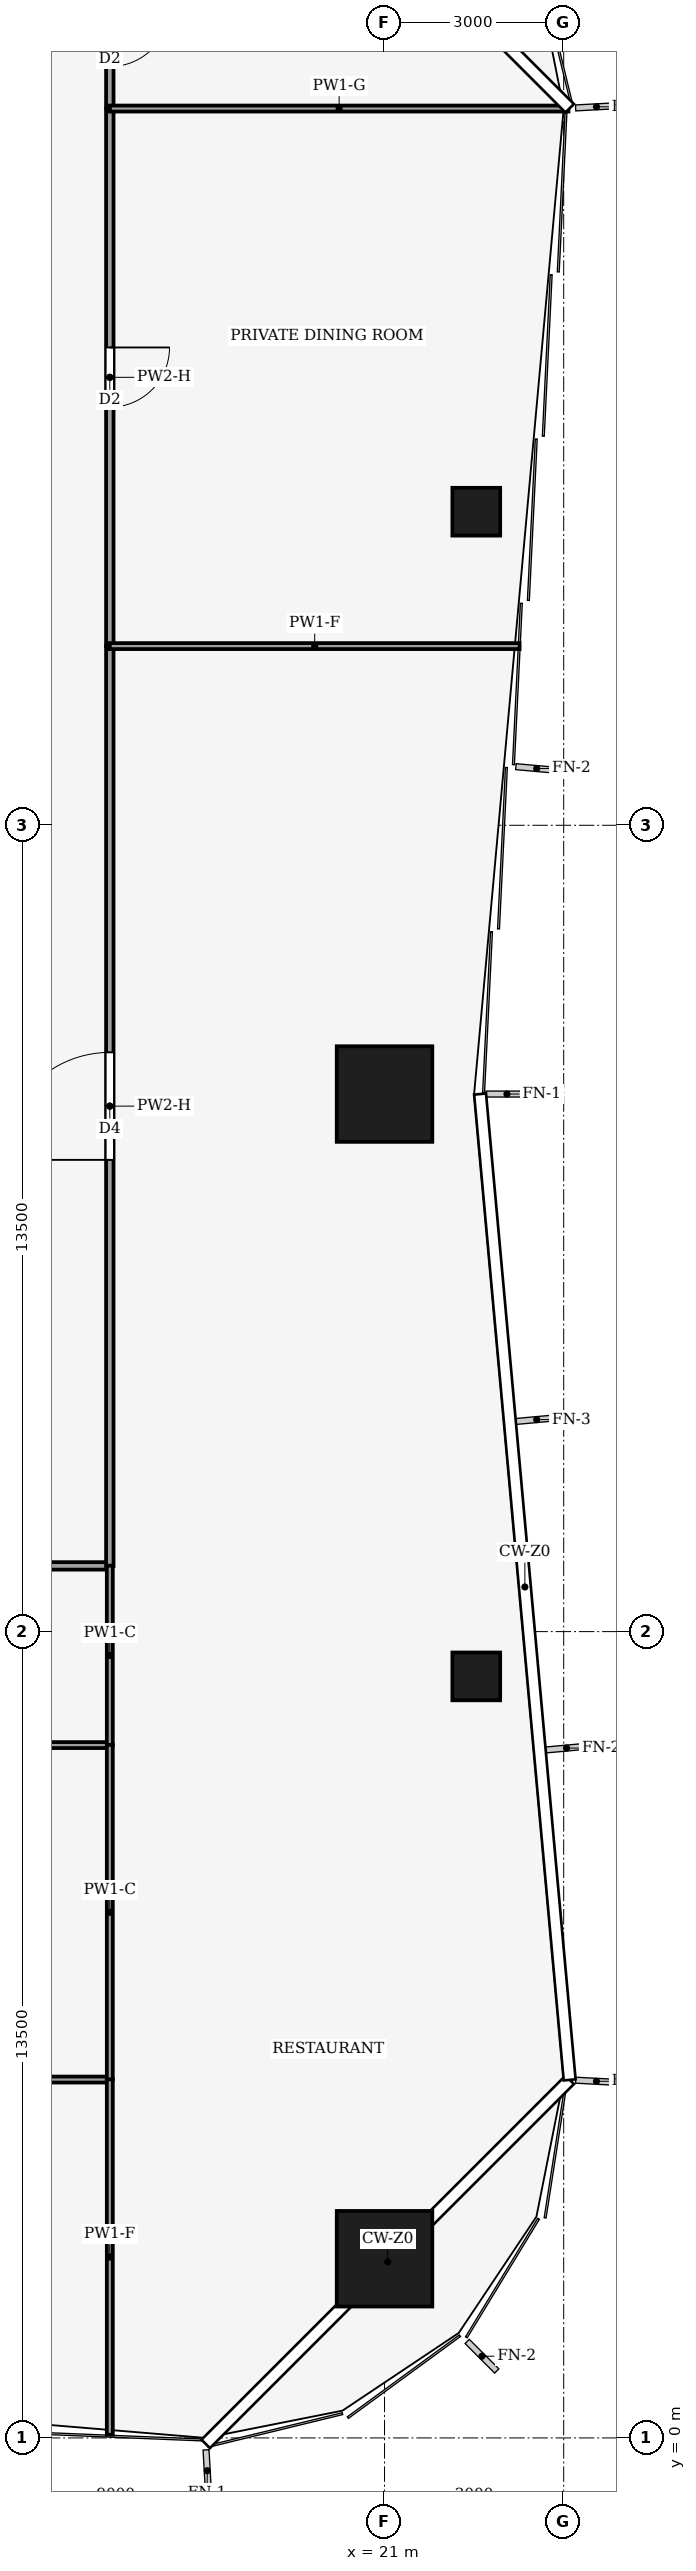
"""IFC4 building model, lengths in metres.
Left out: names, types, materials, properties, quantities, classifications, styles, units other than length and angle.
Written with IfcOpenShell. Run it as: python <this file> out.ifc"""

import sys

from ifc_helpers import new_model, si_unit, direction, frame, frame_2d, origin, origin_2d, place, context, subcontext, project, spatial, rectangle, hollow_rectangle, extrude, element, fill, save


model = new_model("IFC4")
c1 = context("Model", 3, precision=1e-05, world=origin(), true_north=direction((0.0, 1.0)))
c2 = subcontext(c1, "Body", "Model", "MODEL_VIEW")
j1 = project(units=[si_unit("LENGTHUNIT", "METRE"), si_unit("PLANEANGLEUNIT", "RADIAN")], contexts=[c1])
p1 = place(None, origin())
s1 = spatial("IfcSite", under=j1, at=p1, CompositionType="ELEMENT")
p2 = place(p1, origin())
s2 = spatial("IfcBuilding", under=s1, at=p2, CompositionType="ELEMENT")
p3 = place(p2, frame((0.0, 0.0, 14.0)))
s3 = spatial("IfcBuildingStorey", under=s2, at=p3, CompositionType="ELEMENT", Elevation=14.0)
for number, where, z_axis, x_axis in (
    (1, (21.0, 22.5, 0.0), (0.0, 0.0, 1.0), (1.0, 0.0, 0.0)),
    (2, (21.0, 3.0, 0.0), (0.0, 0.0, 1.0), (1.0, 0.0, 0.0)),
):
    element("IfcColumn", number, at=place(p3, frame(where, z_axis=z_axis, x_axis=x_axis)), inside=s3, PredefinedType="COLUMN", context=c2, shape_type="SweptSolid", body=[
        extrude(hollow_rectangle(XDim=1.6, YDim=1.6, WallThickness=0.09, at=origin_2d()), origin(), (0.0, 0.0, 1.0), 4.0),
    ])
for number, where, z_axis, x_axis in (
    (3, (22.536, 12.75, 0.0), (0.0, 0.0, 1.0), (1.0, 0.0, 0.0)),
    (4, (22.536, 32.25, 0.0), (0.0, 0.0, 1.0), (1.0, 0.0, 0.0)),
):
    element("IfcColumn", number, at=place(p3, frame(where, z_axis=z_axis, x_axis=x_axis)), inside=s3, PredefinedType="COLUMN", context=c2, shape_type="SweptSolid", body=[
        extrude(hollow_rectangle(XDim=0.8, YDim=0.8, WallThickness=0.04, at=origin_2d()), origin(), (0.0, 0.0, 1.0), 4.0),
    ])
p4 = place(p3, frame((16.4, 14.6, 0.0), z_axis=(0.0, 0.0, 1.0), x_axis=(-1.0, 0.0, 0.0)))
e5 = element("IfcWall", 5, at=p4, inside=s3, PredefinedType="PARTITIONING", context=c2, shape_type="SweptSolid", body=[
    extrude(rectangle(XDim=4.4, YDim=0.125, at=frame_2d((2.2, 0.0))), origin(), (0.0, 0.0, 1.0), 3.29),
])
p5 = place(p4, frame((1.7, 0.0, 0.0)))
e6 = element("IfcOpeningElement", 6, at=p5, cuts=e5, PredefinedType="OPENING", context=c2, shape_type="SweptSolid", body=[
    extrude(rectangle(XDim=1.0, YDim=2.1, at=frame_2d((0.5, 1.05))), frame((0.0, 0.073, 0.0), z_axis=(0.0, -1.0, 0.0), x_axis=(1.0, 0.0, 0.0)), (0.0, 0.0, 1.0), 0.145),
])
p6 = place(p3, frame((16.4, 14.596, 0.0), z_axis=(0.0, 0.0, 1.0), x_axis=(0.0, 1.0, 0.0)))
e7 = element("IfcWall", 7, at=p6, inside=s3, PredefinedType="PARTITIONING", context=c2, shape_type="SweptSolid", body=[
    extrude(rectangle(XDim=15.404, YDim=0.125, at=frame_2d((7.702, 0.0))), origin(), (0.0, 0.0, 1.0), 3.14),
])
p7 = place(p6, frame((6.802, 0.0, 0.0)))
e8 = element("IfcOpeningElement", 8, at=p7, cuts=e7, PredefinedType="OPENING", context=c2, shape_type="SweptSolid", body=[
    extrude(rectangle(XDim=1.8, YDim=2.1, at=frame_2d((0.9, 1.05))), frame((0.0, 0.073, 0.0), z_axis=(0.0, -1.0, 0.0), x_axis=(1.0, 0.0, 0.0)), (0.0, 0.0, 1.0), 0.145),
])
p8 = place(p3, frame((16.4, 39.0, 0.0), z_axis=(0.0, 0.0, 1.0), x_axis=(0.0, -1.0, 0.0)))
e9 = element("IfcWall", 9, at=p8, inside=s3, PredefinedType="PARTITIONING", context=c2, shape_type="SweptSolid", body=[
    extrude(rectangle(XDim=9.0, YDim=0.125, at=frame_2d((4.5, 0.0))), origin(), (0.0, 0.0, 1.0), 3.14),
])
p9 = place(p8, frame((4.0, 0.0, 0.0)))
e10 = element("IfcOpeningElement", 10, at=p9, cuts=e9, PredefinedType="OPENING", context=c2, shape_type="SweptSolid", body=[
    extrude(rectangle(XDim=1.0, YDim=2.1, at=frame_2d((0.5, 1.05))), frame((0.0, 0.073, 0.0), z_axis=(0.0, -1.0, 0.0), x_axis=(1.0, 0.0, 0.0)), (0.0, 0.0, 1.0), 0.145),
])
p10 = place(p3, frame((16.4, 41.404, 0.0), z_axis=(0.0, 0.0, 1.0), x_axis=(0.0, -1.0, 0.0)))
e11 = element("IfcWall", 11, at=p10, inside=s3, PredefinedType="PARTITIONING", context=c2, shape_type="SweptSolid", body=[
    extrude(rectangle(XDim=2.404, YDim=0.125, at=frame_2d((1.202, 0.0))), origin(), (0.0, 0.0, 1.0), 3.14),
])
p11 = place(p10, frame((0.702, 0.0, 0.0)))
e12 = element("IfcOpeningElement", 12, at=p11, cuts=e11, PredefinedType="OPENING", context=c2, shape_type="SweptSolid", body=[
    extrude(rectangle(XDim=1.0, YDim=2.1, at=frame_2d((0.5, 1.05))), frame((0.0, 0.073, 0.0), z_axis=(0.0, -1.0, 0.0), x_axis=(1.0, 0.0, 0.0)), (0.0, 0.0, 1.0), 0.145),
])
p12 = place(p3, frame((11.996, 11.6, 0.0), z_axis=(0.0, 0.0, 1.0), x_axis=(1.0, 0.0, 0.0)))
e13 = element("IfcWall", 13, at=p12, inside=s3, PredefinedType="PARTITIONING", context=c2, shape_type="SweptSolid", body=[
    extrude(rectangle(XDim=4.404, YDim=0.1, at=frame_2d((2.202, 0.0))), origin(), (0.0, 0.0, 1.0), 3.29),
])
p13 = place(p3, frame((16.4, 11.596, 0.0), z_axis=(0.0, 0.0, 1.0), x_axis=(0.0, 1.0, 0.0)))
e14 = element("IfcWall", 14, at=p13, inside=s3, PredefinedType="PARTITIONING", context=c2, shape_type="SweptSolid", body=[
    extrude(rectangle(XDim=3.008, YDim=0.1, at=frame_2d((1.504, 0.0))), origin(), (0.0, 0.0, 1.0), 3.87),
])
p14 = place(p3, frame((16.4, 6.0, 0.0), z_axis=(0.0, 0.0, 1.0), x_axis=(-1.0, 0.0, 0.0)))
e15 = element("IfcWall", 15, at=p14, inside=s3, PredefinedType="PARTITIONING", context=c2, shape_type="SweptSolid", body=[
    extrude(rectangle(XDim=7.4, YDim=0.1, at=frame_2d((3.7, 0.0))), origin(), (0.0, 0.0, 1.0), 3.29),
])
p15 = place(p14, frame((3.2, 0.0, 0.0)))
e16 = element("IfcOpeningElement", 16, at=p15, cuts=e15, PredefinedType="OPENING", context=c2, shape_type="SweptSolid", body=[
    extrude(rectangle(XDim=1.0, YDim=2.1, at=frame_2d((0.5, 1.05))), frame((0.0, 0.06, 0.0), z_axis=(0.0, -1.0, 0.0), x_axis=(1.0, 0.0, 0.0)), (0.0, 0.0, 1.0), 0.12),
])
p16 = place(p3, frame((16.4, 5.996, 0.0), z_axis=(0.0, 0.0, 1.0), x_axis=(0.0, 1.0, 0.0)))
e17 = element("IfcWall", 17, at=p16, inside=s3, PredefinedType="PARTITIONING", context=c2, shape_type="SweptSolid", body=[
    extrude(rectangle(XDim=5.608, YDim=0.1, at=frame_2d((2.804, 0.0))), origin(), (0.0, 0.0, 1.0), 3.87),
])
p17 = place(p3, frame((16.4, 0.053, 0.0), z_axis=(0.0, 0.0, 1.0), x_axis=(0.0, 1.0, 0.0)))
e18 = element("IfcWall", 18, at=p17, inside=s3, PredefinedType="PARTITIONING", context=c2, shape_type="SweptSolid", body=[
    extrude(rectangle(XDim=5.951, YDim=0.1, at=frame_2d((2.975, 0.0))), origin(), (0.0, 0.0, 1.0), 3.04),
])
p18 = place(p3, frame((23.262, 30.0, 0.0), z_axis=(0.0, 0.0, 1.0), x_axis=(-1.0, 0.0, 0.0)))
e19 = element("IfcWall", 19, at=p18, inside=s3, PredefinedType="PARTITIONING", context=c2, shape_type="SweptSolid", body=[
    extrude(rectangle(XDim=6.862, YDim=0.1, at=frame_2d((3.431, 0.0))), origin(), (0.0, 0.0, 1.0), 3.04),
])
p19 = place(p3, frame((24.08, 39.0, 0.0), z_axis=(0.0, 0.0, 1.0), x_axis=(-1.0, 0.0, 0.0)))
e20 = element("IfcWall", 20, at=p19, inside=s3, PredefinedType="PARTITIONING", context=c2, shape_type="SweptSolid", body=[
    extrude(rectangle(XDim=7.68, YDim=0.1, at=frame_2d((3.84, 0.0))), origin(), (0.0, 0.0, 1.0), 2.93),
])
p20 = place(p7, origin())
e21 = element("IfcDoor", 21, at=p20, inside=s3, OperationType="DOUBLE_DOOR_SINGLE_SWING", PredefinedType="DOOR", context=c2, shape_type="SweptSolid", body=[
    extrude(rectangle(XDim=1.8, YDim=2.1, at=frame_2d((0.9, 1.05))), frame((0.0, 0.025, 0.0), z_axis=(0.0, -1.0, 0.0), x_axis=(1.0, 0.0, 0.0)), (0.0, 0.0, 1.0), 0.05),
])
fill(e8, e21)
p21 = place(p9, origin())
e22 = element("IfcDoor", 22, at=p21, inside=s3, OperationType="SINGLE_SWING_LEFT", PredefinedType="DOOR", context=c2, shape_type="SweptSolid", body=[
    extrude(rectangle(XDim=1.0, YDim=2.1, at=frame_2d((0.5, 1.05))), frame((0.0, 0.025, 0.0), z_axis=(0.0, -1.0, 0.0), x_axis=(1.0, 0.0, 0.0)), (0.0, 0.0, 1.0), 0.05),
])
fill(e10, e22)
p22 = place(p11, origin())
e23 = element("IfcDoor", 23, at=p22, inside=s3, OperationType="SINGLE_SWING_RIGHT", PredefinedType="DOOR", context=c2, shape_type="SweptSolid", body=[
    extrude(rectangle(XDim=1.0, YDim=2.1, at=frame_2d((0.5, 1.05))), frame((0.0, 0.025, 0.0), z_axis=(0.0, -1.0, 0.0), x_axis=(1.0, 0.0, 0.0)), (0.0, 0.0, 1.0), 0.05),
])
fill(e12, e23)
save(model, sys.argv[1])
